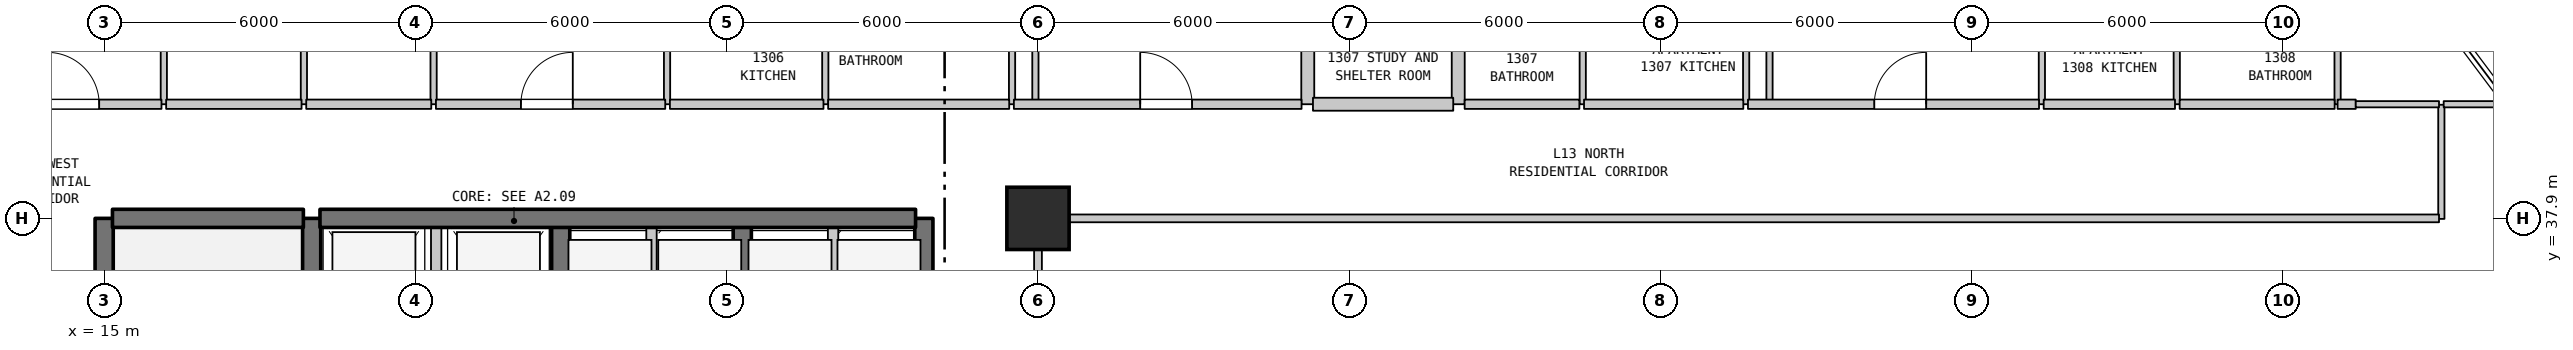
"""IFC4 building model, lengths in metres.
Left out: names, types, materials, properties, quantities, classifications, styles, units other than length and angle.
Written with IfcOpenShell. Run it as: python <this file> out.ifc"""

import sys

from ifc_helpers import new_model, si_unit, direction, frame, frame_2d, origin, origin_2d, place, context, subcontext, project, spatial, rectangle, extrude, element, fill, save


model = new_model("IFC4")
c1 = context("Model", 3, precision=1e-05, world=origin(), true_north=direction((0.0, 1.0)))
c2 = subcontext(c1, "Body", "Model", "MODEL_VIEW")
j1 = project(units=[si_unit("LENGTHUNIT", "METRE"), si_unit("PLANEANGLEUNIT", "RADIAN")], contexts=[c1])
p1 = place(None, origin())
s1 = spatial("IfcSite", under=j1, at=p1, CompositionType="ELEMENT")
p2 = place(p1, origin())
s2 = spatial("IfcBuilding", under=s1, at=p2, CompositionType="ELEMENT")
p3 = place(p2, frame((0.0, 0.0, 57.3)))
s3 = spatial("IfcBuildingStorey", under=s2, at=p3, CompositionType="ELEMENT", Elevation=57.3)
p4 = place(p3, frame((33.0, 37.9, 0.0), z_axis=(0.0, 0.0, 1.0), x_axis=(1.0, 0.0, 0.0)))
e1 = element("IfcColumn", 1, at=p4, inside=s3, PredefinedType="COLUMN", context=c2, shape_type="SweptSolid", body=[
    extrude(rectangle(XDim=1.2, YDim=1.2, at=origin_2d()), origin(), (0.0, 0.0, 1.0), 3.7),
])
p5 = place(p3, frame((15.0, 31.1, 0.0), z_axis=(0.0, 0.0, 1.0), x_axis=(0.0, 1.0, 0.0)))
e2 = element("IfcWall", 2, at=p5, inside=s3, PredefinedType="SHEAR", context=c2, shape_type="SweptSolid", body=[
    extrude(rectangle(XDim=6.8, YDim=0.35, at=frame_2d((3.4, 0.0))), origin(), (0.0, 0.0, 1.0), 3.28),
])
p6 = place(p3, frame((16.15, 40.1, 0.0), z_axis=(0.0, 0.0, 1.0), x_axis=(0.0, 1.0, 0.0)))
e3 = element("IfcWall", 3, at=p6, inside=s3, PredefinedType="PARTITIONING", context=c2, shape_type="SweptSolid", body=[
    extrude(rectangle(XDim=3.2, YDim=0.12, at=frame_2d((1.6, 0.0))), origin(), (0.0, 0.0, 1.0), 3.28),
])
p7 = place(p3, frame((18.85, 40.1, 0.0), z_axis=(0.0, 0.0, 1.0), x_axis=(0.0, 1.0, 0.0)))
e4 = element("IfcWall", 4, at=p7, inside=s3, PredefinedType="PARTITIONING", context=c2, shape_type="SweptSolid", body=[
    extrude(rectangle(XDim=3.2, YDim=0.12, at=frame_2d((1.6, 0.0))), origin(), (0.0, 0.0, 1.0), 3.28),
])
p8 = place(p7, frame((1.15, 0.0, 0.0)))
e5 = element("IfcOpeningElement", 5, at=p8, cuts=e4, PredefinedType="OPENING", context=c2, shape_type="SweptSolid", body=[
    extrude(rectangle(XDim=0.9, YDim=2.15, at=frame_2d((0.45, 1.075))), frame((0.0, 0.07, 0.0), z_axis=(0.0, -1.0, 0.0), x_axis=(1.0, 0.0, 0.0)), (0.0, 0.0, 1.0), 0.14),
])
p9 = place(p3, frame((19.0, 35.0, 0.0), z_axis=(0.0, 0.0, 1.0), x_axis=(0.0, 1.0, 0.0)))
e6 = element("IfcWall", 6, at=p9, inside=s3, PredefinedType="SHEAR", context=c2, shape_type="SweptSolid", body=[
    extrude(rectangle(XDim=2.9, YDim=0.35, at=frame_2d((1.45, 0.0))), origin(), (0.0, 0.0, 1.0), 3.28),
])
p10 = place(p3, frame((21.35, 40.1, 0.0), z_axis=(0.0, 0.0, 1.0), x_axis=(0.0, 1.0, 0.0)))
e7 = element("IfcWall", 7, at=p10, inside=s3, PredefinedType="PARTITIONING", context=c2, shape_type="SweptSolid", body=[
    extrude(rectangle(XDim=13.79, YDim=0.12, at=frame_2d((6.895, 0.0))), origin(), (0.0, 0.0, 1.0), 3.28),
])
p11 = place(p3, frame((21.4, 35.0, 0.0), z_axis=(0.0, 0.0, 1.0), x_axis=(0.0, 1.0, 0.0)))
e8 = element("IfcWall", 8, at=p11, inside=s3, PredefinedType="STANDARD", context=c2, shape_type="SweptSolid", body=[
    extrude(rectangle(XDim=2.9, YDim=0.2, at=frame_2d((1.45, 0.0))), origin(), (0.0, 0.0, 1.0), 3.28),
])
p12 = place(p3, frame((23.8, 35.0, 0.0), z_axis=(0.0, 0.0, 1.0), x_axis=(0.0, 1.0, 0.0)))
e9 = element("IfcWall", 9, at=p12, inside=s3, PredefinedType="SHEAR", context=c2, shape_type="SweptSolid", body=[
    extrude(rectangle(XDim=2.9, YDim=0.35, at=frame_2d((1.45, 0.0))), origin(), (0.0, 0.0, 1.0), 3.28),
])
p13 = place(p3, frame((25.55, 35.0, 0.0), z_axis=(0.0, 0.0, 1.0), x_axis=(0.0, 1.0, 0.0)))
e10 = element("IfcWall", 10, at=p13, inside=s3, PredefinedType="STANDARD", context=c2, shape_type="SweptSolid", body=[
    extrude(rectangle(XDim=2.9, YDim=0.2, at=frame_2d((1.45, 0.0))), origin(), (0.0, 0.0, 1.0), 3.28),
])
p14 = place(p3, frame((25.85, 40.1, 0.0), z_axis=(0.0, 0.0, 1.0), x_axis=(0.0, 1.0, 0.0)))
e11 = element("IfcWall", 11, at=p14, inside=s3, PredefinedType="PARTITIONING", context=c2, shape_type="SweptSolid", body=[
    extrude(rectangle(XDim=2.3, YDim=0.12, at=frame_2d((1.15, 0.0))), origin(), (0.0, 0.0, 1.0), 3.28),
])
p15 = place(p3, frame((27.3, 35.0, 0.0), z_axis=(0.0, 0.0, 1.0), x_axis=(0.0, 1.0, 0.0)))
e12 = element("IfcWall", 12, at=p15, inside=s3, PredefinedType="SHEAR", context=c2, shape_type="SweptSolid", body=[
    extrude(rectangle(XDim=2.9, YDim=0.35, at=frame_2d((1.45, 0.0))), origin(), (0.0, 0.0, 1.0), 3.28),
])
p16 = place(p3, frame((28.9, 40.1, 0.0), z_axis=(0.0, 0.0, 1.0), x_axis=(0.0, 1.0, 0.0)))
e13 = element("IfcWall", 13, at=p16, inside=s3, PredefinedType="PARTITIONING", context=c2, shape_type="SweptSolid", body=[
    extrude(rectangle(XDim=2.3, YDim=0.12, at=frame_2d((1.15, 0.0))), origin(), (0.0, 0.0, 1.0), 3.28),
])
p17 = place(p3, frame((29.05, 35.0, 0.0), z_axis=(0.0, 0.0, 1.0), x_axis=(0.0, 1.0, 0.0)))
e14 = element("IfcWall", 14, at=p17, inside=s3, PredefinedType="STANDARD", context=c2, shape_type="SweptSolid", body=[
    extrude(rectangle(XDim=2.9, YDim=0.2, at=frame_2d((1.45, 0.0))), origin(), (0.0, 0.0, 1.0), 3.28),
])
p18 = place(p3, frame((30.8, 35.0, 0.0), z_axis=(0.0, 0.0, 1.0), x_axis=(0.0, 1.0, 0.0)))
e15 = element("IfcWall", 15, at=p18, inside=s3, PredefinedType="SHEAR", context=c2, shape_type="SweptSolid", body=[
    extrude(rectangle(XDim=2.9, YDim=0.35, at=frame_2d((1.45, 0.0))), origin(), (0.0, 0.0, 1.0), 3.28),
])
p19 = place(p3, frame((32.5, 40.1, 0.0), z_axis=(0.0, 0.0, 1.0), x_axis=(0.0, 1.0, 0.0)))
e16 = element("IfcWall", 16, at=p19, inside=s3, PredefinedType="PARTITIONING", context=c2, shape_type="SweptSolid", body=[
    extrude(rectangle(XDim=2.3, YDim=0.12, at=frame_2d((1.15, 0.0))), origin(), (0.0, 0.0, 1.0), 3.28),
])
p20 = place(p3, frame((32.95, 40.1, 0.0), z_axis=(0.0, 0.0, 1.0), x_axis=(0.0, 1.0, 0.0)))
e17 = element("IfcWall", 17, at=p20, inside=s3, PredefinedType="PARTITIONING", context=c2, shape_type="SweptSolid", body=[
    extrude(rectangle(XDim=2.05, YDim=0.12, at=frame_2d((1.025, 0.0))), origin(), (0.0, 0.0, 1.0), 2.68),
])
p21 = place(p3, frame((33.0, 27.91, 0.0), z_axis=(0.0, 0.0, 1.0), x_axis=(0.0, 1.0, 0.0)))
e18 = element("IfcWall", 18, at=p21, inside=s3, PredefinedType="STANDARD", context=c2, shape_type="SweptSolid", body=[
    extrude(rectangle(XDim=9.98, YDim=0.15, at=frame_2d((4.99, 0.0))), origin(), (0.0, 0.0, 1.0), 2.78),
])
for number, where, z_axis, x_axis in (
    (19, (38.2, 40.1, 0.0), (0.0, 0.0, 1.0), (0.0, 1.0, 0.0)),
    (20, (41.1, 40.1, 0.0), (0.0, 0.0, 1.0), (0.0, 1.0, 0.0)),
):
    element("IfcWall", number, at=place(p3, frame(where, z_axis=z_axis, x_axis=x_axis)), inside=s3, PredefinedType="STANDARD", context=c2, shape_type="SweptSolid", body=[
        extrude(rectangle(XDim=2.3, YDim=0.25, at=frame_2d((1.15, 0.0))), origin(), (0.0, 0.0, 1.0), 3.28),
    ])
for number, where, z_axis, x_axis in (
    (21, (43.5, 40.1, 0.0), (0.0, 0.0, 1.0), (0.0, 1.0, 0.0)),
    (22, (46.65, 40.1, 0.0), (0.0, 0.0, 1.0), (0.0, 1.0, 0.0)),
):
    element("IfcWall", number, at=place(p3, frame(where, z_axis=z_axis, x_axis=x_axis)), inside=s3, PredefinedType="PARTITIONING", context=c2, shape_type="SweptSolid", body=[
        extrude(rectangle(XDim=2.3, YDim=0.12, at=frame_2d((1.15, 0.0))), origin(), (0.0, 0.0, 1.0), 3.28),
    ])
p22 = place(p3, frame((47.1, 40.1, 0.0), z_axis=(0.0, 0.0, 1.0), x_axis=(0.0, 1.0, 0.0)))
e23 = element("IfcWall", 23, at=p22, inside=s3, PredefinedType="PARTITIONING", context=c2, shape_type="SweptSolid", body=[
    extrude(rectangle(XDim=2.05, YDim=0.12, at=frame_2d((1.025, 0.0))), origin(), (0.0, 0.0, 1.0), 3.28),
])
for number, where, z_axis, x_axis in (
    (24, (52.35, 40.1, 0.0), (0.0, 0.0, 1.0), (0.0, 1.0, 0.0)),
    (25, (54.95, 40.1, 0.0), (0.0, 0.0, 1.0), (0.0, 1.0, 0.0)),
    (26, (58.05, 40.1, 0.0), (0.0, 0.0, 1.0), (0.0, 1.0, 0.0)),
):
    element("IfcWall", number, at=place(p3, frame(where, z_axis=z_axis, x_axis=x_axis)), inside=s3, PredefinedType="PARTITIONING", context=c2, shape_type="SweptSolid", body=[
        extrude(rectangle(XDim=2.3, YDim=0.12, at=frame_2d((1.15, 0.0))), origin(), (0.0, 0.0, 1.0), 3.28),
    ])
p23 = place(p3, frame((60.05, 37.89, 0.0), z_axis=(0.0, 0.0, 1.0), x_axis=(0.0, 1.0, 0.0)))
e27 = element("IfcWall", 27, at=p23, inside=s3, PredefinedType="PARTITIONING", context=c2, shape_type="SweptSolid", body=[
    extrude(rectangle(XDim=2.2, YDim=0.12, at=frame_2d((1.1, 0.0))), origin(), (0.0, 0.0, 1.0), 3.28),
])
p24 = place(p3, frame((15.16, 37.9, 0.0), z_axis=(0.0, 0.0, 1.0), x_axis=(1.0, 0.0, 0.0)))
e28 = element("IfcWall", 28, at=p24, inside=s3, PredefinedType="SHEAR", context=c2, shape_type="SweptSolid", body=[
    extrude(rectangle(XDim=3.68, YDim=0.35, at=frame_2d((1.84, 0.0))), origin(), (0.0, 0.0, 1.0), 3.28),
])
p25 = place(p3, frame((19.16, 37.9, 0.0), z_axis=(0.0, 0.0, 1.0), x_axis=(1.0, 0.0, 0.0)))
e29 = element("IfcWall", 29, at=p25, inside=s3, PredefinedType="SHEAR", context=c2, shape_type="SweptSolid", body=[
    extrude(rectangle(XDim=11.48, YDim=0.35, at=frame_2d((5.74, 0.0))), origin(), (0.0, 0.0, 1.0), 3.28),
])
p26 = place(p3, frame((33.07, 37.9, 0.0), z_axis=(0.0, 0.0, 1.0), x_axis=(1.0, 0.0, 0.0)))
e30 = element("IfcWall", 30, at=p26, inside=s3, PredefinedType="STANDARD", context=c2, shape_type="SweptSolid", body=[
    extrude(rectangle(XDim=26.935, YDim=0.15, at=frame_2d((13.467, 0.0))), origin(), (0.0, 0.0, 1.0), 3.28),
])
p27 = place(p3, frame((12.875, 40.1, 0.0), z_axis=(0.0, 0.0, 1.0), x_axis=(1.0, 0.0, 0.0)))
e31 = element("IfcWall", 31, at=p27, inside=s3, PredefinedType="STANDARD", context=c2, shape_type="SweptSolid", body=[
    extrude(rectangle(XDim=3.23, YDim=0.18, at=frame_2d((1.615, 0.0))), origin(), (0.0, 0.0, 1.0), 3.28),
])
p28 = place(p27, frame((1.029, 0.0, 0.0)))
e32 = element("IfcOpeningElement", 32, at=p28, cuts=e31, PredefinedType="OPENING", context=c2, shape_type="SweptSolid", body=[
    extrude(rectangle(XDim=1.0, YDim=2.15, at=frame_2d((0.5, 1.075))), frame((0.0, 0.1, 0.0), z_axis=(0.0, -1.0, 0.0), x_axis=(1.0, 0.0, 0.0)), (0.0, 0.0, 1.0), 0.2),
])
p29 = place(p3, frame((16.195, 40.1, 0.0), z_axis=(0.0, 0.0, 1.0), x_axis=(1.0, 0.0, 0.0)))
e33 = element("IfcWall", 33, at=p29, inside=s3, PredefinedType="STANDARD", context=c2, shape_type="SweptSolid", body=[
    extrude(rectangle(XDim=2.61, YDim=0.18, at=frame_2d((1.305, 0.0))), origin(), (0.0, 0.0, 1.0), 3.28),
])
p30 = place(p3, frame((18.895, 40.1, 0.0), z_axis=(0.0, 0.0, 1.0), x_axis=(1.0, 0.0, 0.0)))
e34 = element("IfcWall", 34, at=p30, inside=s3, PredefinedType="STANDARD", context=c2, shape_type="SweptSolid", body=[
    extrude(rectangle(XDim=2.41, YDim=0.18, at=frame_2d((1.205, 0.0))), origin(), (0.0, 0.0, 1.0), 3.28),
])
p31 = place(p3, frame((21.395, 40.1, 0.0), z_axis=(0.0, 0.0, 1.0), x_axis=(1.0, 0.0, 0.0)))
e35 = element("IfcWall", 35, at=p31, inside=s3, PredefinedType="STANDARD", context=c2, shape_type="SweptSolid", body=[
    extrude(rectangle(XDim=4.42, YDim=0.18, at=frame_2d((2.21, 0.0))), origin(), (0.0, 0.0, 1.0), 3.28),
])
p32 = place(p31, frame((1.638, 0.0, 0.0)))
e36 = element("IfcOpeningElement", 36, at=p32, cuts=e35, PredefinedType="OPENING", context=c2, shape_type="SweptSolid", body=[
    extrude(rectangle(XDim=1.0, YDim=2.15, at=frame_2d((0.5, 1.075))), frame((0.0, 0.1, 0.0), z_axis=(0.0, -1.0, 0.0), x_axis=(1.0, 0.0, 0.0)), (0.0, 0.0, 1.0), 0.2),
])
p33 = place(p3, frame((25.905, 40.1, 0.0), z_axis=(0.0, 0.0, 1.0), x_axis=(1.0, 0.0, 0.0)))
e37 = element("IfcWall", 37, at=p33, inside=s3, PredefinedType="STANDARD", context=c2, shape_type="SweptSolid", body=[
    extrude(rectangle(XDim=2.96, YDim=0.18, at=frame_2d((1.48, 0.0))), origin(), (0.0, 0.0, 1.0), 3.28),
])
p34 = place(p3, frame((28.955, 40.1, 0.0), z_axis=(0.0, 0.0, 1.0), x_axis=(1.0, 0.0, 0.0)))
e38 = element("IfcWall", 38, at=p34, inside=s3, PredefinedType="STANDARD", context=c2, shape_type="SweptSolid", body=[
    extrude(rectangle(XDim=3.49, YDim=0.18, at=frame_2d((1.745, 0.0))), origin(), (0.0, 0.0, 1.0), 3.28),
])
p35 = place(p3, frame((32.535, 40.1, 0.0), z_axis=(0.0, 0.0, 1.0), x_axis=(1.0, 0.0, 0.0)))
e39 = element("IfcWall", 39, at=p35, inside=s3, PredefinedType="STANDARD", context=c2, shape_type="SweptSolid", body=[
    extrude(rectangle(XDim=5.545, YDim=0.18, at=frame_2d((2.772, 0.0))), origin(), (0.0, 0.0, 1.0), 3.28),
])
p36 = place(p35, frame((2.435, 0.0, 0.0)))
e40 = element("IfcOpeningElement", 40, at=p36, cuts=e39, PredefinedType="OPENING", context=c2, shape_type="SweptSolid", body=[
    extrude(rectangle(XDim=1.0, YDim=2.15, at=frame_2d((0.5, 1.075))), frame((0.0, 0.1, 0.0), z_axis=(0.0, -1.0, 0.0), x_axis=(1.0, 0.0, 0.0)), (0.0, 0.0, 1.0), 0.2),
])
p37 = place(p3, frame((38.3, 40.1, 0.0), z_axis=(0.0, 0.0, 1.0), x_axis=(1.0, 0.0, 0.0)))
e41 = element("IfcWall", 41, at=p37, inside=s3, PredefinedType="STANDARD", context=c2, shape_type="SweptSolid", body=[
    extrude(rectangle(XDim=2.704, YDim=0.25, at=frame_2d((1.352, 0.0))), origin(), (0.0, 0.0, 1.0), 3.28),
])
p38 = place(p3, frame((41.224, 40.1, 0.0), z_axis=(0.0, 0.0, 1.0), x_axis=(1.0, 0.0, 0.0)))
e42 = element("IfcWall", 42, at=p38, inside=s3, PredefinedType="STANDARD", context=c2, shape_type="SweptSolid", body=[
    extrude(rectangle(XDim=2.211, YDim=0.18, at=frame_2d((1.105, 0.0))), origin(), (0.0, 0.0, 1.0), 3.28),
])
p39 = place(p3, frame((43.525, 40.1, 0.0), z_axis=(0.0, 0.0, 1.0), x_axis=(1.0, 0.0, 0.0)))
e43 = element("IfcWall", 43, at=p39, inside=s3, PredefinedType="STANDARD", context=c2, shape_type="SweptSolid", body=[
    extrude(rectangle(XDim=3.07, YDim=0.18, at=frame_2d((1.535, 0.0))), origin(), (0.0, 0.0, 1.0), 3.28),
])
p40 = place(p3, frame((46.685, 40.1, 0.0), z_axis=(0.0, 0.0, 1.0), x_axis=(1.0, 0.0, 0.0)))
e44 = element("IfcWall", 44, at=p40, inside=s3, PredefinedType="STANDARD", context=c2, shape_type="SweptSolid", body=[
    extrude(rectangle(XDim=5.61, YDim=0.18, at=frame_2d((2.805, 0.0))), origin(), (0.0, 0.0, 1.0), 3.28),
])
p41 = place(p40, frame((2.435, 0.0, 0.0)))
e45 = element("IfcOpeningElement", 45, at=p41, cuts=e44, PredefinedType="OPENING", context=c2, shape_type="SweptSolid", body=[
    extrude(rectangle(XDim=1.0, YDim=2.15, at=frame_2d((0.5, 1.075))), frame((0.0, 0.1, 0.0), z_axis=(0.0, -1.0, 0.0), x_axis=(1.0, 0.0, 0.0)), (0.0, 0.0, 1.0), 0.2),
])
p42 = place(p3, frame((52.385, 40.1, 0.0), z_axis=(0.0, 0.0, 1.0), x_axis=(1.0, 0.0, 0.0)))
e46 = element("IfcWall", 46, at=p42, inside=s3, PredefinedType="STANDARD", context=c2, shape_type="SweptSolid", body=[
    extrude(rectangle(XDim=2.531, YDim=0.18, at=frame_2d((1.266, 0.0))), origin(), (0.0, 0.0, 1.0), 3.28),
])
p43 = place(p3, frame((55.006, 40.1, 0.0), z_axis=(0.0, 0.0, 1.0), x_axis=(1.0, 0.0, 0.0)))
e47 = element("IfcWall", 47, at=p43, inside=s3, PredefinedType="STANDARD", context=c2, shape_type="SweptSolid", body=[
    extrude(rectangle(XDim=2.987, YDim=0.18, at=frame_2d((1.493, 0.0))), origin(), (0.0, 0.0, 1.0), 3.28),
])
p44 = place(p3, frame((58.05, 40.1, 0.0), z_axis=(0.0, 0.0, 1.0), x_axis=(1.0, 0.0, 0.0)))
e48 = element("IfcWall", 48, at=p44, inside=s3, PredefinedType="STANDARD", context=c2, shape_type="SweptSolid", body=[
    extrude(rectangle(XDim=0.35, YDim=0.18, at=frame_2d((0.175, 0.0))), origin(), (0.0, 0.0, 1.0), 3.28),
])
p45 = place(p3, frame((58.4, 40.1, 0.0), z_axis=(0.0, 0.0, 1.0), x_axis=(1.0, 0.0, 0.0)))
e49 = element("IfcWall", 49, at=p45, inside=s3, PredefinedType="PARTITIONING", context=c2, shape_type="SweptSolid", body=[
    extrude(rectangle(XDim=1.605, YDim=0.12, at=frame_2d((0.802, 0.0))), origin(), (0.0, 0.0, 1.0), 3.28),
])
p46 = place(p3, frame((60.095, 40.1, 0.0), z_axis=(0.0, 0.0, 1.0), x_axis=(1.0, 0.0, 0.0)))
e50 = element("IfcWall", 50, at=p46, inside=s3, PredefinedType="PARTITIONING", context=c2, shape_type="SweptSolid", body=[
    extrude(rectangle(XDim=1.245, YDim=0.12, at=frame_2d((0.623, 0.0))), origin(), (0.0, 0.0, 1.0), 3.28),
])
p47 = place(p28, origin())
e51 = element("IfcDoor", 51, at=p47, inside=s3, OperationType="SINGLE_SWING_LEFT", PredefinedType="DOOR", context=c2, shape_type="SweptSolid", body=[
    extrude(rectangle(XDim=1.0, YDim=2.15, at=frame_2d((0.5, 1.075))), frame((0.0, 0.025, 0.0), z_axis=(0.0, -1.0, 0.0), x_axis=(1.0, 0.0, 0.0)), (0.0, 0.0, 1.0), 0.05),
])
fill(e32, e51)
p48 = place(p32, origin())
e52 = element("IfcDoor", 52, at=p48, inside=s3, OperationType="SINGLE_SWING_RIGHT", PredefinedType="DOOR", context=c2, shape_type="SweptSolid", body=[
    extrude(rectangle(XDim=1.0, YDim=2.15, at=frame_2d((0.5, 1.075))), frame((0.0, 0.025, 0.0), z_axis=(0.0, -1.0, 0.0), x_axis=(1.0, 0.0, 0.0)), (0.0, 0.0, 1.0), 0.05),
])
fill(e36, e52)
p49 = place(p36, origin())
e53 = element("IfcDoor", 53, at=p49, inside=s3, OperationType="SINGLE_SWING_LEFT", PredefinedType="DOOR", context=c2, shape_type="SweptSolid", body=[
    extrude(rectangle(XDim=1.0, YDim=2.15, at=frame_2d((0.5, 1.075))), frame((0.0, 0.025, 0.0), z_axis=(0.0, -1.0, 0.0), x_axis=(1.0, 0.0, 0.0)), (0.0, 0.0, 1.0), 0.05),
])
fill(e40, e53)
p50 = place(p41, origin())
e54 = element("IfcDoor", 54, at=p50, inside=s3, OperationType="SINGLE_SWING_RIGHT", PredefinedType="DOOR", context=c2, shape_type="SweptSolid", body=[
    extrude(rectangle(XDim=1.0, YDim=2.15, at=frame_2d((0.5, 1.075))), frame((0.0, 0.025, 0.0), z_axis=(0.0, -1.0, 0.0), x_axis=(1.0, 0.0, 0.0)), (0.0, 0.0, 1.0), 0.05),
])
fill(e45, e54)
save(model, sys.argv[1])
